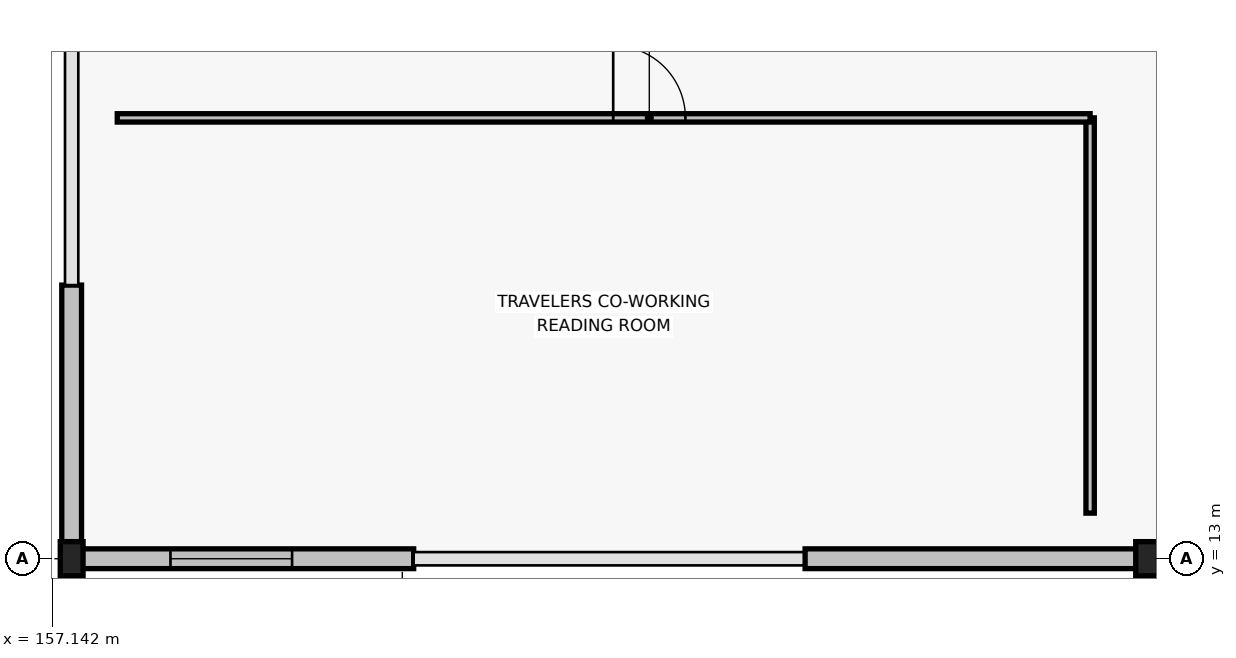
"""IFC4 building model, lengths in metres.
Left out: names, types, materials, properties, quantities, classifications, styles, units other than length and angle.
Written with IfcOpenShell. Run it as: python <this file> out.ifc"""

import sys

from ifc_helpers import new_model, si_unit, direction, frame, frame_2d, origin, origin_2d, place, context, subcontext, project, spatial, rectangle, i_section, extrude, element, fill, save


model = new_model("IFC4")
c1 = context("Model", 3, precision=1e-05, world=origin(), true_north=direction((0.0, 1.0)))
c2 = subcontext(c1, "Body", "Model", "MODEL_VIEW")
j1 = project(units=[si_unit("LENGTHUNIT", "METRE"), si_unit("PLANEANGLEUNIT", "RADIAN")], contexts=[c1])
p1 = place(None, origin())
s1 = spatial("IfcSite", under=j1, at=p1, CompositionType="ELEMENT")
p2 = place(p1, origin())
s2 = spatial("IfcBuilding", under=s1, at=p2, CompositionType="ELEMENT")
p3 = place(p2, frame((0.0, 0.0, 5.4)))
s3 = spatial("IfcBuildingStorey", under=s2, at=p3, CompositionType="ELEMENT", Elevation=5.4)
for number, where, z_axis, x_axis in (
    (1, (157.4, 13.0, 0.0), (0.0, 0.0, 1.0), (1.0, 0.0, 0.0)),
    (2, (171.55, 13.0, 0.0), (0.0, 0.0, 1.0), (1.0, 0.0, 0.0)),
):
    element("IfcColumn", number, at=place(p3, frame(where, z_axis=z_axis, x_axis=x_axis)), inside=s3, PredefinedType="COLUMN", context=c2, shape_type="SweptSolid", body=[
        extrude(i_section(OverallWidth=0.3, OverallDepth=0.45, WebThickness=0.014, FlangeThickness=0.026, FilletRadius=0.027, at=origin_2d()), origin(), (0.0, 0.0, 1.0), 5.4),
    ])
p4 = place(p3, frame((157.4, 13.0, 0.0), z_axis=(0.0, 0.0, 1.0), x_axis=(1.0, 0.0, 0.0)))
e3 = element("IfcWall", 3, at=p4, inside=s3, PredefinedType="STANDARD", context=c2, shape_type="SweptSolid", body=[
    extrude(rectangle(XDim=4.5, YDim=0.26, at=frame_2d((2.25, 0.0))), origin(), (0.0, 0.0, 1.0), 4.625),
])
p5 = place(p4, frame((1.3, 0.0, 0.7)))
e4 = element("IfcOpeningElement", 4, at=p5, cuts=e3, PredefinedType="OPENING", context=c2, shape_type="SweptSolid", body=[
    extrude(rectangle(XDim=1.6, YDim=1.5, at=frame_2d((0.8, 0.75))), frame((0.0, 0.14, 0.0), z_axis=(0.0, -1.0, 0.0), x_axis=(1.0, 0.0, 0.0)), (0.0, 0.0, 1.0), 0.28),
])
p6 = place(p3, frame((167.05, 13.0, 0.0), z_axis=(0.0, 0.0, 1.0), x_axis=(1.0, 0.0, 0.0)))
e5 = element("IfcWall", 5, at=p6, inside=s3, PredefinedType="STANDARD", context=c2, shape_type="SweptSolid", body=[
    extrude(rectangle(XDim=4.5, YDim=0.26, at=frame_2d((2.25, 0.0))), origin(), (0.0, 0.0, 1.0), 4.625),
])
p7 = place(p3, frame((171.55, 13.0, 0.0), z_axis=(0.0, 0.0, 1.0), x_axis=(1.0, 0.0, 0.0)))
e6 = element("IfcWall", 6, at=p7, inside=s3, PredefinedType="STANDARD", context=c2, shape_type="SweptSolid", body=[
    extrude(rectangle(XDim=4.5, YDim=0.26, at=frame_2d((2.25, 0.0))), origin(), (0.0, 0.0, 1.0), 4.625),
])
p8 = place(p7, frame((1.3, 0.0, 0.7)))
e7 = element("IfcOpeningElement", 7, at=p8, cuts=e6, PredefinedType="OPENING", context=c2, shape_type="SweptSolid", body=[
    extrude(rectangle(XDim=1.6, YDim=1.5, at=frame_2d((0.8, 0.75))), frame((0.0, 0.14, 0.0), z_axis=(0.0, -1.0, 0.0), x_axis=(1.0, 0.0, 0.0)), (0.0, 0.0, 1.0), 0.28),
])
p9 = place(p3, frame((157.4, 13.13, 0.0), z_axis=(0.0, 0.0, 1.0), x_axis=(0.0, 1.0, 0.0)))
e8 = element("IfcWall", 8, at=p9, inside=s3, PredefinedType="STANDARD", context=c2, shape_type="SweptSolid", body=[
    extrude(rectangle(XDim=3.47, YDim=0.26, at=frame_2d((1.735, 0.0))), origin(), (0.0, 0.0, 1.0), 4.675),
])
p10 = place(p3, frame((170.8, 13.6, 0.0), z_axis=(0.0, 0.0, 1.0), x_axis=(0.0, 1.0, 0.0)))
e9 = element("IfcWall", 9, at=p10, inside=s3, PredefinedType="MOVABLE", context=c2, shape_type="SweptSolid", body=[
    extrude(rectangle(XDim=5.2, YDim=0.11, at=frame_2d((2.6, 0.0))), origin(), (0.0, 0.0, 1.0), 4.675),
])
p11 = place(p3, frame((170.8, 18.8, 0.0), z_axis=(0.0, 0.0, 1.0), x_axis=(-1.0, 0.0, 0.0)))
e10 = element("IfcWall", 10, at=p11, inside=s3, PredefinedType="MOVABLE", context=c2, shape_type="SweptSolid", body=[
    extrude(rectangle(XDim=12.8, YDim=0.11, at=frame_2d((6.4, 0.0))), origin(), (0.0, 0.0, 1.0), 5.16),
])
p12 = place(p11, frame((5.325, 0.0, 0.0)))
e11 = element("IfcOpeningElement", 11, at=p12, cuts=e10, PredefinedType="OPENING", context=c2, shape_type="SweptSolid", body=[
    extrude(rectangle(XDim=0.95, YDim=2.15, at=frame_2d((0.475, 1.075))), frame((0.0, 0.065, 0.0), z_axis=(0.0, -1.0, 0.0), x_axis=(1.0, 0.0, 0.0)), (0.0, 0.0, 1.0), 0.13),
])
p13 = place(p5, origin())
e12 = element("IfcWindow", 12, at=p13, inside=s3, PartitioningType="SINGLE_PANEL", PredefinedType="WINDOW", context=c2, shape_type="SweptSolid", body=[
    extrude(rectangle(XDim=1.6, YDim=1.5, at=frame_2d((0.8, 0.75))), frame((0.0, 0.03, 0.0), z_axis=(0.0, -1.0, 0.0), x_axis=(1.0, 0.0, 0.0)), (0.0, 0.0, 1.0), 0.06),
])
fill(e4, e12)
p14 = place(p12, origin())
e13 = element("IfcDoor", 13, at=p14, inside=s3, OperationType="SINGLE_SWING_RIGHT", PredefinedType="DOOR", context=c2, shape_type="SweptSolid", body=[
    extrude(rectangle(XDim=0.95, YDim=2.15, at=frame_2d((0.475, 1.075))), frame((0.0, 0.025, 0.0), z_axis=(0.0, -1.0, 0.0), x_axis=(1.0, 0.0, 0.0)), (0.0, 0.0, 1.0), 0.05),
])
fill(e11, e13)
save(model, sys.argv[1])
